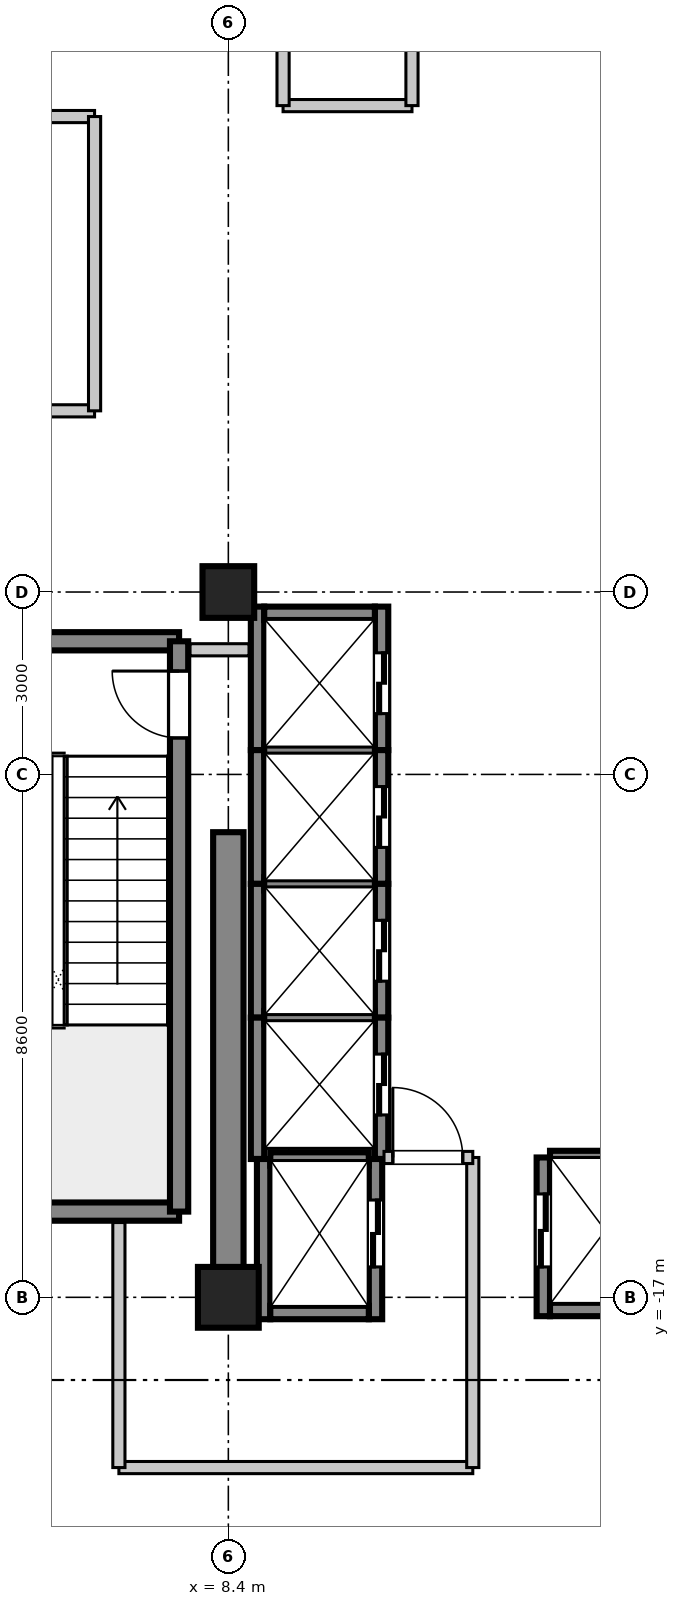
"""IFC4 building model, lengths in metres.
Left out: names, types, materials, properties, quantities, classifications, styles, units other than length and angle.
Written with IfcOpenShell. Run it as: python <this file> out.ifc"""

import sys

from ifc_helpers import new_model, si_unit, direction, frame, frame_2d, origin, origin_2d, place, context, subcontext, project, spatial, rectangle, extrude, source, transform, mapped, element, fill, save


model = new_model("IFC4")
c1 = context("Model", 3, precision=1e-05, world=origin(), true_north=direction((0.0, 1.0)))
c2 = subcontext(c1, "Body", "Model", "MODEL_VIEW")
j1 = project(units=[si_unit("LENGTHUNIT", "METRE"), si_unit("PLANEANGLEUNIT", "RADIAN")], contexts=[c1])
p1 = place(None, origin())
s1 = spatial("IfcSite", under=j1, at=p1, CompositionType="ELEMENT")
p2 = place(p1, origin())
s2 = spatial("IfcBuilding", under=s1, at=p2, CompositionType="ELEMENT")
p3 = place(p2, frame((0.0, 0.0, 261.5)))
s3 = spatial("IfcBuildingStorey", under=s2, at=p3, CompositionType="ELEMENT", Elevation=261.5)
m1 = source(origin(), c2, "Body", "SweptSolid", [
    extrude(rectangle(XDim=1.0, YDim=1.0, at=origin_2d()), origin(), (0.0, 0.0, 1.0), 4.755),
])
p4 = place(p3, frame((8.4, -17.0, 0.0), z_axis=(0.0, 0.0, 1.0), x_axis=(1.0, 0.0, 0.0)))
e1 = element("IfcColumn", 1, at=p4, inside=s3, PredefinedType="COLUMN", context=c2, shape_type="MappedRepresentation", body=[
    mapped(m1, transform((0.0, 0.0, 0.0), scale=1.0)),
])
m2 = source(origin(), c2, "Body", "SweptSolid", [
    extrude(rectangle(XDim=0.85, YDim=0.85, at=origin_2d()), origin(), (0.0, 0.0, 1.0), 4.755),
])
p5 = place(p3, frame((8.4, -5.4, 0.0), z_axis=(0.0, 0.0, 1.0), x_axis=(1.0, 0.0, 0.0)))
e2 = element("IfcColumn", 2, at=p5, inside=s3, PredefinedType="PILASTER", context=c2, shape_type="MappedRepresentation", body=[
    mapped(m2, transform((0.0, 0.0, 0.0), scale=1.0)),
])
m3 = source(origin(), c2, "Body", "SweptSolid", [
    extrude(rectangle(XDim=7.65, YDim=0.5, at=frame_2d((3.825, 0.0))), origin(), (0.0, 0.0, 1.0), 4.5),
])
p6 = place(p3, frame((8.4, -17.0, 0.0), z_axis=(0.0, 0.0, 1.0), x_axis=(0.0, 1.0, 0.0)))
e3 = element("IfcWall", 3, at=p6, inside=s3, PredefinedType="SHEAR", context=c2, shape_type="MappedRepresentation", body=[
    mapped(m3, transform((0.0, 0.0, 0.0), scale=1.0)),
])
m4 = source(origin(), c2, "Body", "SweptSolid", [
    extrude(rectangle(XDim=3.98, YDim=0.3, at=frame_2d((1.99, 0.0))), origin(), (0.0, 0.0, 1.0), 4.5),
])
for number, where, z_axis, x_axis in (
    (4, (3.61, -15.59, 0.0), (0.0, 0.0, 1.0), (1.0, 0.0, 0.0)),
    (5, (3.61, -6.21, 0.0), (0.0, 0.0, 1.0), (1.0, 0.0, 0.0)),
):
    element("IfcWall", number, at=place(p3, frame(where, z_axis=z_axis, x_axis=x_axis)), inside=s3, PredefinedType="SHEAR", context=c2, shape_type="MappedRepresentation", body=[
        mapped(m4, transform((0.0, 0.0, 0.0), scale=1.0)),
    ])
m5 = source(origin(), c2, "Body", "SweptSolid", [
    extrude(rectangle(XDim=9.38, YDim=0.3, at=frame_2d((4.69, 0.0))), origin(), (0.0, 0.0, 1.0), 4.5),
])
p7 = place(p3, frame((7.59, -15.59, 0.0), z_axis=(0.0, 0.0, 1.0), x_axis=(0.0, 1.0, 0.0)))
e6 = element("IfcWall", 6, at=p7, inside=s3, PredefinedType="SHEAR", context=c2, shape_type="MappedRepresentation", body=[
    mapped(m5, transform((0.0, 0.0, 0.0), scale=1.0)),
])
p8 = place(p7, frame((7.79, 0.0, 0.0)))
e7 = element("IfcOpeningElement", 7, at=p8, cuts=e6, PredefinedType="OPENING", context=c2, shape_type="SweptSolid", body=[
    extrude(rectangle(XDim=1.1, YDim=2.15, at=frame_2d((0.55, 1.075))), frame((0.0, 0.16, 0.0), z_axis=(0.0, -1.0, 0.0), x_axis=(1.0, 0.0, 0.0)), (0.0, 0.0, 1.0), 0.32),
])
m6 = source(origin(), c2, "Body", "SweptSolid", [
    extrude(rectangle(XDim=2.36, YDim=0.22, at=frame_2d((1.18, 0.0))), origin(), (0.0, 0.0, 1.0), 4.5),
])
p9 = place(p3, frame((8.88, -8.0, 0.0), z_axis=(0.0, 0.0, 1.0), x_axis=(0.0, 1.0, 0.0)))
e8 = element("IfcWall", 8, at=p9, inside=s3, PredefinedType="SHEAR", context=c2, shape_type="MappedRepresentation", body=[
    mapped(m6, transform((0.0, 0.0, 0.0), scale=1.0)),
])
p10 = place(p3, frame((10.92, -8.0, 0.0), z_axis=(0.0, 0.0, 1.0), x_axis=(0.0, 1.0, 0.0)))
e9 = element("IfcWall", 9, at=p10, inside=s3, PredefinedType="SHEAR", context=c2, shape_type="MappedRepresentation", body=[
    mapped(m6, transform((0.0, 0.0, 0.0), scale=1.0)),
])
p11 = place(p10, frame((0.6, 0.0, 0.0)))
e10 = element("IfcOpeningElement", 10, at=p11, cuts=e9, PredefinedType="OPENING", context=c2, shape_type="SweptSolid", body=[
    extrude(rectangle(XDim=1.0, YDim=2.2, at=frame_2d((0.5, 1.1))), frame((0.0, 0.12, 0.0), z_axis=(0.0, -1.0, 0.0), x_axis=(1.0, 0.0, 0.0)), (0.0, 0.0, 1.0), 0.24),
])
m7 = source(origin(), c2, "Body", "SweptSolid", [
    extrude(rectangle(XDim=1.82, YDim=0.22, at=frame_2d((0.91, 0.0))), origin(), (0.0, 0.0, 1.0), 4.5),
])
p12 = place(p3, frame((8.99, -5.75, 0.0), z_axis=(0.0, 0.0, 1.0), x_axis=(1.0, 0.0, 0.0)))
e11 = element("IfcWall", 11, at=p12, inside=s3, PredefinedType="SHEAR", context=c2, shape_type="MappedRepresentation", body=[
    mapped(m7, transform((0.0, 0.0, 0.0), scale=1.0)),
])
m8 = source(origin(), c2, "Body", "SweptSolid", [
    extrude(rectangle(XDim=2.2, YDim=0.22, at=frame_2d((1.1, 0.0))), origin(), (0.0, 0.0, 1.0), 4.5),
])
p13 = place(p3, frame((8.88, -10.2, 0.0), z_axis=(0.0, 0.0, 1.0), x_axis=(0.0, 1.0, 0.0)))
e12 = element("IfcWall", 12, at=p13, inside=s3, PredefinedType="SHEAR", context=c2, shape_type="MappedRepresentation", body=[
    mapped(m8, transform((0.0, 0.0, 0.0), scale=1.0)),
])
p14 = place(p3, frame((10.92, -10.2, 0.0), z_axis=(0.0, 0.0, 1.0), x_axis=(0.0, 1.0, 0.0)))
e13 = element("IfcWall", 13, at=p14, inside=s3, PredefinedType="SHEAR", context=c2, shape_type="MappedRepresentation", body=[
    mapped(m8, transform((0.0, 0.0, 0.0), scale=1.0)),
])
p15 = place(p14, frame((0.6, 0.0, 0.0)))
e14 = element("IfcOpeningElement", 14, at=p15, cuts=e13, PredefinedType="OPENING", context=c2, shape_type="SweptSolid", body=[
    extrude(rectangle(XDim=1.0, YDim=2.2, at=frame_2d((0.5, 1.1))), frame((0.0, 0.12, 0.0), z_axis=(0.0, -1.0, 0.0), x_axis=(1.0, 0.0, 0.0)), (0.0, 0.0, 1.0), 0.24),
])
m9 = source(origin(), c2, "Body", "SweptSolid", [
    extrude(rectangle(XDim=1.82, YDim=0.22, at=frame_2d((0.91, 0.0))), origin(), (0.0, 0.0, 1.0), 4.8),
])
p16 = place(p3, frame((8.99, -8.0, 0.0), z_axis=(0.0, 0.0, 1.0), x_axis=(1.0, 0.0, 0.0)))
e15 = element("IfcWall", 15, at=p16, inside=s3, PredefinedType="SHEAR", context=c2, shape_type="MappedRepresentation", body=[
    mapped(m9, transform((0.0, 0.0, 0.0), scale=1.0)),
])
p17 = place(p3, frame((8.88, -12.4, 0.0), z_axis=(0.0, 0.0, 1.0), x_axis=(0.0, 1.0, 0.0)))
e16 = element("IfcWall", 16, at=p17, inside=s3, PredefinedType="SHEAR", context=c2, shape_type="MappedRepresentation", body=[
    mapped(m8, transform((0.0, 0.0, 0.0), scale=1.0)),
])
p18 = place(p3, frame((10.92, -12.4, 0.0), z_axis=(0.0, 0.0, 1.0), x_axis=(0.0, 1.0, 0.0)))
e17 = element("IfcWall", 17, at=p18, inside=s3, PredefinedType="SHEAR", context=c2, shape_type="MappedRepresentation", body=[
    mapped(m8, transform((0.0, 0.0, 0.0), scale=1.0)),
])
p19 = place(p18, frame((0.6, 0.0, 0.0)))
e18 = element("IfcOpeningElement", 18, at=p19, cuts=e17, PredefinedType="OPENING", context=c2, shape_type="SweptSolid", body=[
    extrude(rectangle(XDim=1.0, YDim=2.2, at=frame_2d((0.5, 1.1))), frame((0.0, 0.12, 0.0), z_axis=(0.0, -1.0, 0.0), x_axis=(1.0, 0.0, 0.0)), (0.0, 0.0, 1.0), 0.24),
])
p20 = place(p3, frame((8.99, -10.2, 0.0), z_axis=(0.0, 0.0, 1.0), x_axis=(1.0, 0.0, 0.0)))
e19 = element("IfcWall", 19, at=p20, inside=s3, PredefinedType="SHEAR", context=c2, shape_type="MappedRepresentation", body=[
    mapped(m9, transform((0.0, 0.0, 0.0), scale=1.0)),
])
m10 = source(origin(), c2, "Body", "SweptSolid", [
    extrude(rectangle(XDim=2.325, YDim=0.22, at=frame_2d((1.163, 0.0))), origin(), (0.0, 0.0, 1.0), 4.5),
])
p21 = place(p3, frame((8.88, -14.725, 0.0), z_axis=(0.0, 0.0, 1.0), x_axis=(0.0, 1.0, 0.0)))
e20 = element("IfcWall", 20, at=p21, inside=s3, PredefinedType="SHEAR", context=c2, shape_type="MappedRepresentation", body=[
    mapped(m10, transform((0.0, 0.0, 0.0), scale=1.0)),
])
p22 = place(p3, frame((10.92, -14.725, 0.0), z_axis=(0.0, 0.0, 1.0), x_axis=(0.0, 1.0, 0.0)))
e21 = element("IfcWall", 21, at=p22, inside=s3, PredefinedType="SHEAR", context=c2, shape_type="MappedRepresentation", body=[
    mapped(m10, transform((0.0, 0.0, 0.0), scale=1.0)),
])
p23 = place(p22, frame((0.725, 0.0, 0.0)))
e22 = element("IfcOpeningElement", 22, at=p23, cuts=e21, PredefinedType="OPENING", context=c2, shape_type="SweptSolid", body=[
    extrude(rectangle(XDim=1.0, YDim=2.2, at=frame_2d((0.5, 1.1))), frame((0.0, 0.12, 0.0), z_axis=(0.0, -1.0, 0.0), x_axis=(1.0, 0.0, 0.0)), (0.0, 0.0, 1.0), 0.24),
])
p24 = place(p3, frame((8.99, -12.4, 0.0), z_axis=(0.0, 0.0, 1.0), x_axis=(1.0, 0.0, 0.0)))
e23 = element("IfcWall", 23, at=p24, inside=s3, PredefinedType="SHEAR", context=c2, shape_type="MappedRepresentation", body=[
    mapped(m9, transform((0.0, 0.0, 0.0), scale=1.0)),
])
m11 = source(origin(), c2, "Body", "SweptSolid", [
    extrude(rectangle(XDim=2.635, YDim=0.22, at=frame_2d((1.317, 0.0))), origin(), (0.0, 0.0, 1.0), 4.5),
])
p25 = place(p3, frame((8.98, -17.36, 0.0), z_axis=(0.0, 0.0, 1.0), x_axis=(0.0, 1.0, 0.0)))
e24 = element("IfcWall", 24, at=p25, inside=s3, PredefinedType="SHEAR", context=c2, shape_type="MappedRepresentation", body=[
    mapped(m11, transform((0.0, 0.0, 0.0), scale=1.0)),
])
p26 = place(p3, frame((10.82, -17.36, 0.0), z_axis=(0.0, 0.0, 1.0), x_axis=(0.0, 1.0, 0.0)))
e25 = element("IfcWall", 25, at=p26, inside=s3, PredefinedType="SHEAR", context=c2, shape_type="MappedRepresentation", body=[
    mapped(m11, transform((0.0, 0.0, 0.0), scale=1.0)),
])
p27 = place(p26, frame((0.86, 0.0, 0.0)))
e26 = element("IfcOpeningElement", 26, at=p27, cuts=e25, PredefinedType="OPENING", context=c2, shape_type="SweptSolid", body=[
    extrude(rectangle(XDim=1.1, YDim=2.2, at=frame_2d((0.55, 1.1))), frame((0.0, 0.12, 0.0), z_axis=(0.0, -1.0, 0.0), x_axis=(1.0, 0.0, 0.0)), (0.0, 0.0, 1.0), 0.24),
])
m12 = source(origin(), c2, "Body", "SweptSolid", [
    extrude(rectangle(XDim=1.62, YDim=0.22, at=frame_2d((0.81, 0.0))), origin(), (0.0, 0.0, 1.0), 4.5),
])
p28 = place(p3, frame((9.09, -17.25, 0.0), z_axis=(0.0, 0.0, 1.0), x_axis=(1.0, 0.0, 0.0)))
e27 = element("IfcWall", 27, at=p28, inside=s3, PredefinedType="SHEAR", context=c2, shape_type="MappedRepresentation", body=[
    mapped(m12, transform((0.0, 0.0, 0.0), scale=1.0)),
])
m13 = source(origin(), c2, "Body", "SweptSolid", [
    extrude(rectangle(XDim=1.62, YDim=0.22, at=frame_2d((0.81, 0.0))), origin(), (0.0, 0.0, 1.0), 4.8),
])
p29 = place(p3, frame((9.09, -14.725, 0.0), z_axis=(0.0, 0.0, 1.0), x_axis=(1.0, 0.0, 0.0)))
e28 = element("IfcWall", 28, at=p29, inside=s3, PredefinedType="SHEAR", context=c2, shape_type="MappedRepresentation", body=[
    mapped(m13, transform((0.0, 0.0, 0.0), scale=1.0)),
])
m14 = source(origin(), c2, "Body", "SweptSolid", [
    extrude(rectangle(XDim=2.61, YDim=0.22, at=frame_2d((1.305, 0.0))), origin(), (0.0, 0.0, 1.0), 4.5),
])
p30 = place(p3, frame((13.58, -17.31, 0.0), z_axis=(0.0, 0.0, 1.0), x_axis=(0.0, 1.0, 0.0)))
e29 = element("IfcWall", 29, at=p30, inside=s3, PredefinedType="SHEAR", context=c2, shape_type="MappedRepresentation", body=[
    mapped(m14, transform((0.0, 0.0, 0.0), scale=1.0)),
])
p31 = place(p30, frame((0.81, 0.0, 0.0)))
e30 = element("IfcOpeningElement", 30, at=p31, cuts=e29, PredefinedType="OPENING", context=c2, shape_type="SweptSolid", body=[
    extrude(rectangle(XDim=1.2, YDim=2.2, at=frame_2d((0.6, 1.1))), frame((0.0, 0.12, 0.0), z_axis=(0.0, -1.0, 0.0), x_axis=(1.0, 0.0, 0.0)), (0.0, 0.0, 1.0), 0.24),
])
p32 = place(p3, frame((13.69, -17.2, 0.0), z_axis=(0.0, 0.0, 1.0), x_axis=(1.0, 0.0, 0.0)))
e31 = element("IfcWall", 31, at=p32, inside=s3, PredefinedType="SHEAR", context=c2, shape_type="MappedRepresentation", body=[
    mapped(m7, transform((0.0, 0.0, 0.0), scale=1.0)),
])
p33 = place(p3, frame((13.69, -14.7, 0.0), z_axis=(0.0, 0.0, 1.0), x_axis=(1.0, 0.0, 0.0)))
e32 = element("IfcWall", 32, at=p33, inside=s3, PredefinedType="SHEAR", context=c2, shape_type="MappedRepresentation", body=[
    mapped(m9, transform((0.0, 0.0, 0.0), scale=1.0)),
])
m15 = source(origin(), c2, "Body", "SweptSolid", [
    extrude(rectangle(XDim=5.82, YDim=0.2, at=frame_2d((2.91, 0.0))), origin(), (0.0, 0.0, 1.0), 3.4),
])
p34 = place(p3, frame((6.6, -19.8, 0.0), z_axis=(0.0, 0.0, 1.0), x_axis=(1.0, 0.0, 0.0)))
e33 = element("IfcWall", 33, at=p34, inside=s3, PredefinedType="PARTITIONING", context=c2, shape_type="MappedRepresentation", body=[
    mapped(m15, transform((0.0, 0.0, 0.0), scale=1.0)),
])
m16 = source(origin(), c2, "Body", "SweptSolid", [
    extrude(rectangle(XDim=4.03, YDim=0.2, at=frame_2d((2.015, 0.0))), origin(), (0.0, 0.0, 1.0), 3.4),
])
p35 = place(p3, frame((6.6, -19.8, 0.0), z_axis=(0.0, 0.0, 1.0), x_axis=(0.0, 1.0, 0.0)))
e34 = element("IfcWall", 34, at=p35, inside=s3, PredefinedType="PARTITIONING", context=c2, shape_type="MappedRepresentation", body=[
    mapped(m16, transform((0.0, 0.0, 0.0), scale=1.0)),
])
m17 = source(origin(), c2, "Body", "SweptSolid", [
    extrude(rectangle(XDim=5.1, YDim=0.2, at=frame_2d((2.55, 0.0))), origin(), (0.0, 0.0, 1.0), 3.4),
])
p36 = place(p3, frame((12.42, -19.8, 0.0), z_axis=(0.0, 0.0, 1.0), x_axis=(0.0, 1.0, 0.0)))
e35 = element("IfcWall", 35, at=p36, inside=s3, PredefinedType="PARTITIONING", context=c2, shape_type="MappedRepresentation", body=[
    mapped(m17, transform((0.0, 0.0, 0.0), scale=1.0)),
])
m18 = source(origin(), c2, "Body", "SweptSolid", [
    extrude(rectangle(XDim=1.46, YDim=0.2, at=frame_2d((0.73, 0.0))), origin(), (0.0, 0.0, 1.0), 3.4),
])
p37 = place(p3, frame((10.96, -14.7, 0.0), z_axis=(0.0, 0.0, 1.0), x_axis=(1.0, 0.0, 0.0)))
e36 = element("IfcWall", 36, at=p37, inside=s3, PredefinedType="PARTITIONING", context=c2, shape_type="MappedRepresentation", body=[
    mapped(m18, transform((0.0, 0.0, 0.0), scale=1.0)),
])
p38 = place(p37, frame((0.145, 0.0, 0.0)))
e37 = element("IfcOpeningElement", 37, at=p38, cuts=e36, PredefinedType="OPENING", context=c2, shape_type="SweptSolid", body=[
    extrude(rectangle(XDim=1.15, YDim=2.15, at=frame_2d((0.575, 1.075))), frame((0.0, 0.11, 0.0), z_axis=(0.0, -1.0, 0.0), x_axis=(1.0, 0.0, 0.0)), (0.0, 0.0, 1.0), 0.22),
])
m19 = source(origin(), c2, "Body", "SweptSolid", [
    extrude(rectangle(XDim=0.97, YDim=0.2, at=frame_2d((0.485, 0.0))), origin(), (0.0, 0.0, 1.0), 3.4),
])
p39 = place(p3, frame((7.77, -6.35, 0.0), z_axis=(0.0, 0.0, 1.0), x_axis=(1.0, 0.0, 0.0)))
e38 = element("IfcWall", 38, at=p39, inside=s3, PredefinedType="PARTITIONING", context=c2, shape_type="MappedRepresentation", body=[
    mapped(m19, transform((0.0, 0.0, 0.0), scale=1.0)),
])
m20 = source(origin(), c2, "Body", "SweptSolid", [
    extrude(rectangle(XDim=2.12, YDim=0.2, at=frame_2d((1.06, 0.0))), origin(), (0.0, 0.0, 1.0), 3.4),
])
p40 = place(p3, frame((9.3, 2.6, 0.0), z_axis=(0.0, 0.0, 1.0), x_axis=(1.0, 0.0, 0.0)))
e39 = element("IfcWall", 39, at=p40, inside=s3, PredefinedType="PARTITIONING", context=c2, shape_type="MappedRepresentation", body=[
    mapped(m20, transform((0.0, 0.0, 0.0), scale=1.0)),
])
m21 = source(origin(), c2, "Body", "SweptSolid", [
    extrude(rectangle(XDim=3.05, YDim=0.2, at=frame_2d((1.525, 0.0))), origin(), (0.0, 0.0, 1.0), 3.4),
])
for number, where, z_axis, x_axis in (
    (40, (9.3, 2.6, 0.0), (0.0, 0.0, 1.0), (0.0, 1.0, 0.0)),
    (41, (11.42, 2.6, 0.0), (0.0, 0.0, 1.0), (0.0, 1.0, 0.0)),
):
    element("IfcWall", number, at=place(p3, frame(where, z_axis=z_axis, x_axis=x_axis)), inside=s3, PredefinedType="PARTITIONING", context=c2, shape_type="MappedRepresentation", body=[
        mapped(m21, transform((0.0, 0.0, 0.0), scale=1.0)),
    ])
m22 = source(origin(), c2, "Body", "SweptSolid", [
    extrude(rectangle(XDim=15.3, YDim=0.2, at=frame_2d((7.65, 0.0))), origin(), (0.0, 0.0, 1.0), 3.4),
])
p41 = place(p3, frame((-9.1, -2.42, 0.0), z_axis=(0.0, 0.0, 1.0), x_axis=(1.0, 0.0, 0.0)))
e42 = element("IfcWall", 42, at=p41, inside=s3, PredefinedType="PARTITIONING", context=c2, shape_type="MappedRepresentation", body=[
    mapped(m22, transform((0.0, 0.0, 0.0), scale=1.0)),
])
p42 = place(p41, frame((8.525, 0.0, 0.0)))
e43 = element("IfcOpeningElement", 43, at=p42, cuts=e42, PredefinedType="OPENING", context=c2, shape_type="SweptSolid", body=[
    extrude(rectangle(XDim=1.15, YDim=2.15, at=frame_2d((0.575, 1.075))), frame((0.0, 0.11, 0.0), z_axis=(0.0, -1.0, 0.0), x_axis=(1.0, 0.0, 0.0)), (0.0, 0.0, 1.0), 0.22),
])
p43 = place(p3, frame((-9.1, 2.42, 0.0), z_axis=(0.0, 0.0, 1.0), x_axis=(1.0, 0.0, 0.0)))
e44 = element("IfcWall", 44, at=p43, inside=s3, PredefinedType="PARTITIONING", context=c2, shape_type="MappedRepresentation", body=[
    mapped(m22, transform((0.0, 0.0, 0.0), scale=1.0)),
])
m23 = source(origin(), c2, "Body", "SweptSolid", [
    extrude(rectangle(XDim=4.84, YDim=0.2, at=frame_2d((2.42, 0.0))), origin(), (0.0, 0.0, 1.0), 3.4),
])
p44 = place(p3, frame((6.2, -2.42, 0.0), z_axis=(0.0, 0.0, 1.0), x_axis=(0.0, 1.0, 0.0)))
e45 = element("IfcWall", 45, at=p44, inside=s3, PredefinedType="PARTITIONING", context=c2, shape_type="MappedRepresentation", body=[
    mapped(m23, transform((0.0, 0.0, 0.0), scale=1.0)),
])
m24 = source(origin(), c2, "Body", "SweptSolid", [
    extrude(rectangle(XDim=1.1, YDim=2.15, at=frame_2d((0.55, 1.075))), frame((0.0, 0.025, 0.0), z_axis=(0.0, -1.0, 0.0), x_axis=(1.0, 0.0, 0.0)), (0.0, 0.0, 1.0), 0.05),
])
p45 = place(p8, origin())
e46 = element("IfcDoor", 46, at=p45, inside=s3, OperationType="SINGLE_SWING_RIGHT", PredefinedType="DOOR", context=c2, shape_type="MappedRepresentation", body=[
    mapped(m24, transform((0.0, 0.0, 0.0), scale=1.0)),
])
fill(e7, e46)
m25 = source(origin(), c2, "Body", "SweptSolid", [
    extrude(rectangle(XDim=1.0, YDim=2.2, at=frame_2d((0.5, 1.1))), frame((0.0, 0.025, 0.0), z_axis=(0.0, -1.0, 0.0), x_axis=(1.0, 0.0, 0.0)), (0.0, 0.0, 1.0), 0.05),
])
p46 = place(p11, frame((1.0, 0.0, 0.0), z_axis=(0.0, 0.0, 1.0), x_axis=(-1.0, 0.0, 0.0)))
e47 = element("IfcDoor", 47, at=p46, inside=s3, OperationType="DOUBLE_DOOR_SLIDING", PredefinedType="DOOR", context=c2, shape_type="MappedRepresentation", body=[
    mapped(m25, transform((0.0, 0.0, 0.0), scale=1.0)),
])
fill(e10, e47)
p47 = place(p15, frame((1.0, 0.0, 0.0), z_axis=(0.0, 0.0, 1.0), x_axis=(-1.0, 0.0, 0.0)))
e48 = element("IfcDoor", 48, at=p47, inside=s3, OperationType="DOUBLE_DOOR_SLIDING", PredefinedType="DOOR", context=c2, shape_type="MappedRepresentation", body=[
    mapped(m25, transform((0.0, 0.0, 0.0), scale=1.0)),
])
fill(e14, e48)
p48 = place(p19, frame((1.0, 0.0, 0.0), z_axis=(0.0, 0.0, 1.0), x_axis=(-1.0, 0.0, 0.0)))
e49 = element("IfcDoor", 49, at=p48, inside=s3, OperationType="DOUBLE_DOOR_SLIDING", PredefinedType="DOOR", context=c2, shape_type="MappedRepresentation", body=[
    mapped(m25, transform((0.0, 0.0, 0.0), scale=1.0)),
])
fill(e18, e49)
p49 = place(p23, frame((1.0, 0.0, 0.0), z_axis=(0.0, 0.0, 1.0), x_axis=(-1.0, 0.0, 0.0)))
e50 = element("IfcDoor", 50, at=p49, inside=s3, OperationType="DOUBLE_DOOR_SLIDING", PredefinedType="DOOR", context=c2, shape_type="MappedRepresentation", body=[
    mapped(m25, transform((0.0, 0.0, 0.0), scale=1.0)),
])
fill(e22, e50)
m26 = source(origin(), c2, "Body", "SweptSolid", [
    extrude(rectangle(XDim=1.1, YDim=2.2, at=frame_2d((0.55, 1.1))), frame((0.0, 0.025, 0.0), z_axis=(0.0, -1.0, 0.0), x_axis=(1.0, 0.0, 0.0)), (0.0, 0.0, 1.0), 0.05),
])
p50 = place(p27, frame((1.1, 0.0, 0.0), z_axis=(0.0, 0.0, 1.0), x_axis=(-1.0, 0.0, 0.0)))
e51 = element("IfcDoor", 51, at=p50, inside=s3, OperationType="DOUBLE_DOOR_SLIDING", PredefinedType="DOOR", context=c2, shape_type="MappedRepresentation", body=[
    mapped(m26, transform((0.0, 0.0, 0.0), scale=1.0)),
])
fill(e26, e51)
m27 = source(origin(), c2, "Body", "SweptSolid", [
    extrude(rectangle(XDim=1.2, YDim=2.2, at=frame_2d((0.6, 1.1))), frame((0.0, 0.025, 0.0), z_axis=(0.0, -1.0, 0.0), x_axis=(1.0, 0.0, 0.0)), (0.0, 0.0, 1.0), 0.05),
])
p51 = place(p31, origin())
e52 = element("IfcDoor", 52, at=p51, inside=s3, OperationType="DOUBLE_DOOR_SLIDING", PredefinedType="DOOR", context=c2, shape_type="MappedRepresentation", body=[
    mapped(m27, transform((0.0, 0.0, 0.0), scale=1.0)),
])
fill(e30, e52)
m28 = source(origin(), c2, "Body", "SweptSolid", [
    extrude(rectangle(XDim=1.15, YDim=2.15, at=frame_2d((0.575, 1.075))), frame((0.0, 0.025, 0.0), z_axis=(0.0, -1.0, 0.0), x_axis=(1.0, 0.0, 0.0)), (0.0, 0.0, 1.0), 0.05),
])
p52 = place(p38, origin())
e53 = element("IfcDoor", 53, at=p52, inside=s3, OperationType="SINGLE_SWING_LEFT", PredefinedType="DOOR", context=c2, shape_type="MappedRepresentation", body=[
    mapped(m28, transform((0.0, 0.0, 0.0), scale=1.0)),
])
fill(e37, e53)
save(model, sys.argv[1])
